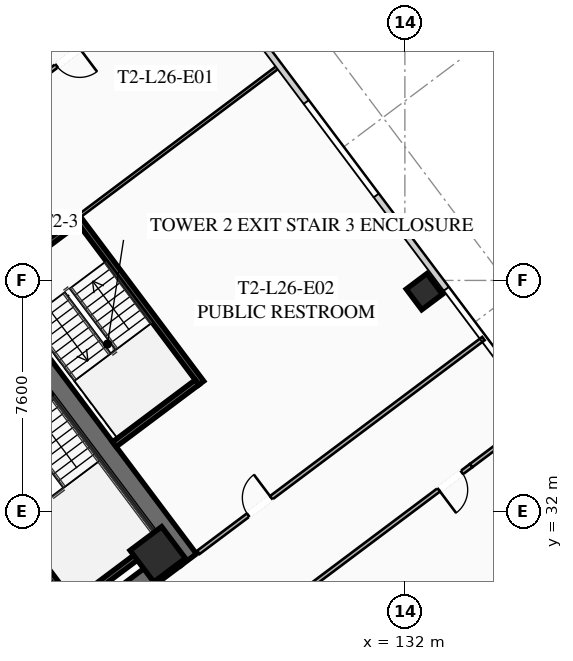
"""IFC4 building model, lengths in metres.
Left out: names, types, materials, properties, quantities, classifications, styles, units other than length and angle.
Written with IfcOpenShell. Run it as: python <this file> out.ifc"""

import sys

from ifc_helpers import new_model, si_unit, direction, frame, frame_2d, origin, origin_2d, place, context, subcontext, project, spatial, rectangle, hollow_rectangle, extrude, element, fill, save


model = new_model("IFC4")
c1 = context("Model", 3, precision=1e-05, world=origin(), true_north=direction((0.0, 1.0)))
c2 = subcontext(c1, "Body", "Model", "MODEL_VIEW")
j1 = project(units=[si_unit("LENGTHUNIT", "METRE"), si_unit("PLANEANGLEUNIT", "RADIAN")], contexts=[c1])
p1 = place(None, origin())
s1 = spatial("IfcSite", under=j1, at=p1, CompositionType="ELEMENT")
p2 = place(p1, origin())
s2 = spatial("IfcBuilding", under=s1, at=p2, CompositionType="ELEMENT")
p3 = place(p2, frame((0.0, 0.0, 99.15)))
s3 = spatial("IfcBuildingStorey", under=s2, at=p3, CompositionType="ELEMENT", Elevation=99.15)
p4 = place(p3, frame((115.524, 42.893, 0.0), z_axis=(0.0, 0.0, 1.0), x_axis=(0.600005007985, -0.799996243986, 0.0)))
e1 = element("IfcWall", 1, at=p4, inside=s3, PredefinedType="SHEAR", context=c2, shape_type="SweptSolid", body=[
    extrude(rectangle(XDim=15.6, YDim=0.65, at=frame_2d((7.8, 0.0))), origin(), (0.0, 0.0, 1.0), 3.55),
])
p5 = place(p3, frame((124.429, 30.478, 0.0), z_axis=(0.0, 0.0, 1.0), x_axis=(-0.799998028465, -0.600002628705, 0.0)))
e2 = element("IfcWall", 2, at=p5, inside=s3, PredefinedType="SHEAR", context=c2, shape_type="SweptSolid", body=[
    extrude(rectangle(XDim=14.86, YDim=0.65, at=frame_2d((7.43, 0.0))), origin(), (0.0, 0.0, 1.0), 3.55),
])
p6 = place(p5, frame((9.13, 0.0, 0.0)))
e3 = element("IfcOpeningElement", 3, at=p6, cuts=e2, PredefinedType="OPENING", context=c2, shape_type="SweptSolid", body=[
    extrude(rectangle(XDim=1.25, YDim=2.25, at=frame_2d((0.625, 1.125))), frame((0.0, 0.335, 0.0), z_axis=(0.0, -1.0, 0.0), x_axis=(1.0, 0.0, 0.0)), (0.0, 0.0, 1.0), 0.67),
])
p7 = place(p5, frame((4.08, 0.0, 0.0)))
e4 = element("IfcOpeningElement", 4, at=p7, cuts=e2, PredefinedType="OPENING", context=c2, shape_type="SweptSolid", body=[
    extrude(rectangle(XDim=1.25, YDim=2.25, at=frame_2d((0.625, 1.125))), frame((0.0, 0.335, 0.0), z_axis=(0.0, -1.0, 0.0), x_axis=(1.0, 0.0, 0.0)), (0.0, 0.0, 1.0), 0.67),
])
p8 = place(p3, frame((123.87, 30.59, 0.0), z_axis=(0.0, 0.0, 1.0), x_axis=(0.799999996291, 0.600000004945, 0.0)))
e5 = element("IfcColumn", 5, at=p8, inside=s3, PredefinedType="COLUMN", context=c2, shape_type="SweptSolid", body=[
    extrude(hollow_rectangle(XDim=1.3, YDim=1.3, WallThickness=0.05, at=origin_2d()), origin(), (0.0, 0.0, 1.0), 3.35),
])
p9 = place(p3, frame((132.64, 39.23, 0.0), z_axis=(0.0, 0.0, 1.0), x_axis=(0.799999996291, 0.600000004945, 0.0)))
e6 = element("IfcColumn", 6, at=p9, inside=s3, PredefinedType="COLUMN", context=c2, shape_type="SweptSolid", body=[
    extrude(hollow_rectangle(XDim=0.85, YDim=0.85, WallThickness=0.035, at=origin_2d()), origin(), (0.0, 0.0, 1.0), 3.35),
])
p10 = place(p3, frame((116.56, 34.92, 0.0), z_axis=(0.0, 0.0, 1.0), x_axis=(0.600009827119, -0.799992629566, 0.0)))
e7 = element("IfcWall", 7, at=p10, inside=s3, PredefinedType="SHEAR", context=c2, shape_type="SweptSolid", body=[
    extrude(rectangle(XDim=7.95, YDim=0.2, at=frame_2d((3.975, 0.0))), origin(), (0.0, 0.0, 1.0), 3.35),
])
p11 = place(p10, frame((0.45, 0.0, 0.0)))
e8 = element("IfcOpeningElement", 8, at=p11, cuts=e7, PredefinedType="OPENING", context=c2, shape_type="SweptSolid", body=[
    extrude(rectangle(XDim=1.15, YDim=2.2, at=frame_2d((0.575, 1.1))), frame((0.0, 0.11, 0.0), z_axis=(0.0, -1.0, 0.0), x_axis=(1.0, 0.0, 0.0)), (0.0, 0.0, 1.0), 0.22),
])
p12 = place(p3, frame((120.98, 28.86, 0.0), z_axis=(0.0, 0.0, 1.0), x_axis=(0.800039270442, 0.59994763584, 0.0)))
e9 = element("IfcWall", 9, at=p12, inside=s3, PredefinedType="SHEAR", context=c2, shape_type="SweptSolid", body=[
    extrude(rectangle(XDim=3.73, YDim=0.2, at=frame_2d((1.865, 0.0))), origin(), (0.0, 0.0, 1.0), 3.35),
])
p13 = place(p3, frame((125.304, 36.228, 0.0), z_axis=(0.0, 0.0, 1.0), x_axis=(-0.59998851072, 0.800008616831, 0.0)))
e10 = element("IfcWall", 10, at=p13, inside=s3, PredefinedType="SHEAR", context=c2, shape_type="SweptSolid", body=[
    extrude(rectangle(XDim=6.8, YDim=0.2, at=frame_2d((3.4, 0.0))), origin(), (0.0, 0.0, 1.0), 3.35),
])
p14 = place(p3, frame((121.204, 41.528, 0.0), z_axis=(0.0, 0.0, 1.0), x_axis=(-0.800017232136, -0.599977023131, 0.0)))
e11 = element("IfcWall", 11, at=p14, inside=s3, PredefinedType="SHEAR", context=c2, shape_type="SweptSolid", body=[
    extrude(rectangle(XDim=3.4, YDim=0.2, at=frame_2d((1.7, 0.0))), origin(), (0.0, 0.0, 1.0), 3.35),
])
p15 = place(p14, frame((1.975, 0.0, 0.0)))
e12 = element("IfcOpeningElement", 12, at=p15, cuts=e11, PredefinedType="OPENING", context=c2, shape_type="SweptSolid", body=[
    extrude(rectangle(XDim=1.15, YDim=2.2, at=frame_2d((0.575, 1.1))), frame((0.0, 0.11, 0.0), z_axis=(0.0, -1.0, 0.0), x_axis=(1.0, 0.0, 0.0)), (0.0, 0.0, 1.0), 0.22),
])
p16 = place(p3, frame((122.444, 34.208, 0.0), z_axis=(0.0, 0.0, 1.0), x_axis=(0.79999138319, 0.600011488909, 0.0)))
e13 = element("IfcWall", 13, at=p16, inside=s3, PredefinedType="SHEAR", context=c2, shape_type="SweptSolid", body=[
    extrude(rectangle(XDim=3.4, YDim=0.2, at=frame_2d((1.7, 0.0))), origin(), (0.0, 0.0, 1.0), 3.35),
])
p17 = place(p3, frame((98.516, 34.012, 0.0), z_axis=(0.0, 0.0, 1.0), x_axis=(0.8, 0.6, 0.0)))
e14 = element("IfcWall", 14, at=p17, inside=s3, PredefinedType="PARTITIONING", context=c2, shape_type="SweptSolid", body=[
    extrude(rectangle(XDim=28.23, YDim=0.135, at=frame_2d((14.115, 0.0))), origin(), (0.0, 0.0, 1.0), 2.703),
])
p18 = place(p17, frame((0.3, 0.0, 0.0)))
e15 = element("IfcOpeningElement", 15, at=p18, cuts=e14, PredefinedType="OPENING", context=c2, shape_type="SweptSolid", body=[
    extrude(rectangle(XDim=0.95, YDim=2.05, at=frame_2d((0.475, 1.025))), frame((0.0, 0.077, 0.0), z_axis=(0.0, -1.0, 0.0), x_axis=(1.0, 0.0, 0.0)), (0.0, 0.0, 1.0), 0.155),
])
p19 = place(p17, frame((10.962, 0.0, 0.0)))
e16 = element("IfcOpeningElement", 16, at=p19, cuts=e14, PredefinedType="OPENING", context=c2, shape_type="SweptSolid", body=[
    extrude(rectangle(XDim=0.95, YDim=2.05, at=frame_2d((0.475, 1.025))), frame((0.0, 0.077, 0.0), z_axis=(0.0, -1.0, 0.0), x_axis=(1.0, 0.0, 0.0)), (0.0, 0.0, 1.0), 0.155),
])
p20 = place(p17, frame((26.98, 0.0, 0.0)))
e17 = element("IfcOpeningElement", 17, at=p20, cuts=e14, PredefinedType="OPENING", context=c2, shape_type="SweptSolid", body=[
    extrude(rectangle(XDim=0.95, YDim=2.05, at=frame_2d((0.475, 1.025))), frame((0.0, 0.077, 0.0), z_axis=(0.0, -1.0, 0.0), x_axis=(1.0, 0.0, 0.0)), (0.0, 0.0, 1.0), 0.155),
])
p21 = place(p3, frame((134.18, 33.51, 0.0), z_axis=(0.0, 0.0, 1.0), x_axis=(-0.8, -0.6, 0.0)))
e18 = element("IfcWall", 18, at=p21, inside=s3, PredefinedType="PARTITIONING", context=c2, shape_type="SweptSolid", body=[
    extrude(rectangle(XDim=28.23, YDim=0.135, at=frame_2d((14.115, 0.0))), origin(), (0.0, 0.0, 1.0), 2.703),
])
p22 = place(p21, frame((26.9, 0.0, 0.0)))
e19 = element("IfcOpeningElement", 19, at=p22, cuts=e18, PredefinedType="OPENING", context=c2, shape_type="SweptSolid", body=[
    extrude(rectangle(XDim=0.95, YDim=2.05, at=frame_2d((0.475, 1.025))), frame((0.0, 0.077, 0.0), z_axis=(0.0, -1.0, 0.0), x_axis=(1.0, 0.0, 0.0)), (0.0, 0.0, 1.0), 0.155),
])
p23 = place(p21, frame((16.296, 0.0, 0.0)))
e20 = element("IfcOpeningElement", 20, at=p23, cuts=e18, PredefinedType="OPENING", context=c2, shape_type="SweptSolid", body=[
    extrude(rectangle(XDim=0.95, YDim=2.05, at=frame_2d((0.475, 1.025))), frame((0.0, 0.077, 0.0), z_axis=(0.0, -1.0, 0.0), x_axis=(1.0, 0.0, 0.0)), (0.0, 0.0, 1.0), 0.155),
])
p24 = place(p21, frame((10.433, 0.0, 0.0)))
e21 = element("IfcOpeningElement", 21, at=p24, cuts=e18, PredefinedType="OPENING", context=c2, shape_type="SweptSolid", body=[
    extrude(rectangle(XDim=0.95, YDim=2.05, at=frame_2d((0.475, 1.025))), frame((0.0, 0.077, 0.0), z_axis=(0.0, -1.0, 0.0), x_axis=(1.0, 0.0, 0.0)), (0.0, 0.0, 1.0), 0.155),
])
p25 = place(p21, frame((0.38, 0.0, 0.0)))
e22 = element("IfcOpeningElement", 22, at=p25, cuts=e18, PredefinedType="OPENING", context=c2, shape_type="SweptSolid", body=[
    extrude(rectangle(XDim=0.95, YDim=2.05, at=frame_2d((0.475, 1.025))), frame((0.0, 0.077, 0.0), z_axis=(0.0, -1.0, 0.0), x_axis=(1.0, 0.0, 0.0)), (0.0, 0.0, 1.0), 0.155),
])
p26 = place(p3, frame((134.18, 33.51, 0.0), z_axis=(0.0, 0.0, 1.0), x_axis=(0.8000207031, 0.599972394874, 0.0)))
e23 = element("IfcWall", 23, at=p26, inside=s3, PredefinedType="PARTITIONING", context=c2, shape_type="SweptSolid", body=[
    extrude(rectangle(XDim=2.83, YDim=0.135, at=frame_2d((1.415, 0.0))), origin(), (0.0, 0.0, 1.0), 2.703),
])
p27 = place(p3, frame((125.224, 50.168, 0.0), z_axis=(0.0, 0.0, 1.0), x_axis=(-0.8, -0.6, 0.0)))
e24 = element("IfcWall", 24, at=p27, inside=s3, PredefinedType="PARTITIONING", context=c2, shape_type="SweptSolid", body=[
    extrude(rectangle(XDim=10.05, YDim=0.135, at=frame_2d((5.025, 0.0))), origin(), (0.0, 0.0, 1.0), 2.703),
])
p28 = place(p27, frame((4.9, 0.0, 0.0)))
e25 = element("IfcOpeningElement", 25, at=p28, cuts=e24, PredefinedType="OPENING", context=c2, shape_type="SweptSolid", body=[
    extrude(rectangle(XDim=0.95, YDim=2.05, at=frame_2d((0.475, 1.025))), frame((0.0, 0.077, 0.0), z_axis=(0.0, -1.0, 0.0), x_axis=(1.0, 0.0, 0.0)), (0.0, 0.0, 1.0), 0.155),
])
p29 = place(p3, frame((125.208, 30.656, 0.0), z_axis=(0.0, 0.0, 1.0), x_axis=(0.8, 0.6, 0.0)))
e26 = element("IfcWall", 26, at=p29, inside=s3, PredefinedType="PARTITIONING", context=c2, shape_type="SweptSolid", body=[
    extrude(rectangle(XDim=11.72, YDim=0.135, at=frame_2d((5.86, 0.0))), origin(), (0.0, 0.0, 1.0), 2.703),
])
p30 = place(p29, frame((2.045, 0.0, 0.0)))
e27 = element("IfcOpeningElement", 27, at=p30, cuts=e26, PredefinedType="OPENING", context=c2, shape_type="SweptSolid", body=[
    extrude(rectangle(XDim=0.95, YDim=2.05, at=frame_2d((0.475, 1.025))), frame((0.0, 0.077, 0.0), z_axis=(0.0, -1.0, 0.0), x_axis=(1.0, 0.0, 0.0)), (0.0, 0.0, 1.0), 0.155),
])
p31 = place(p3, frame((127.864, 46.648, 0.0), z_axis=(0.0, 0.0, 1.0), x_axis=(-0.800007145523, -0.599990472518, 0.0)))
e28 = element("IfcWall", 28, at=p31, inside=s3, PredefinedType="PARTITIONING", context=c2, shape_type="SweptSolid", body=[
    extrude(rectangle(XDim=8.2, YDim=0.11, at=frame_2d((4.1, 0.0))), origin(), (0.0, 0.0, 1.0), 2.703),
])
p32 = place(p25, origin())
e29 = element("IfcDoor", 29, at=p32, inside=s3, OperationType="SINGLE_SWING_RIGHT", PredefinedType="DOOR", context=c2, shape_type="SweptSolid", body=[
    extrude(rectangle(XDim=0.95, YDim=2.05, at=frame_2d((0.475, 1.025))), frame((0.0, 0.025, 0.0), z_axis=(0.0, -1.0, 0.0), x_axis=(1.0, 0.0, 0.0)), (0.0, 0.0, 1.0), 0.05),
])
fill(e22, e29)
p33 = place(p28, origin())
e30 = element("IfcDoor", 30, at=p33, inside=s3, OperationType="SINGLE_SWING_LEFT", PredefinedType="DOOR", context=c2, shape_type="SweptSolid", body=[
    extrude(rectangle(XDim=0.95, YDim=2.05, at=frame_2d((0.475, 1.025))), frame((0.0, 0.025, 0.0), z_axis=(0.0, -1.0, 0.0), x_axis=(1.0, 0.0, 0.0)), (0.0, 0.0, 1.0), 0.05),
])
fill(e25, e30)
p34 = place(p30, origin())
e31 = element("IfcDoor", 31, at=p34, inside=s3, OperationType="SINGLE_SWING_RIGHT", PredefinedType="DOOR", context=c2, shape_type="SweptSolid", body=[
    extrude(rectangle(XDim=0.95, YDim=2.05, at=frame_2d((0.475, 1.025))), frame((0.0, 0.025, 0.0), z_axis=(0.0, -1.0, 0.0), x_axis=(1.0, 0.0, 0.0)), (0.0, 0.0, 1.0), 0.05),
])
fill(e27, e31)
save(model, sys.argv[1])
